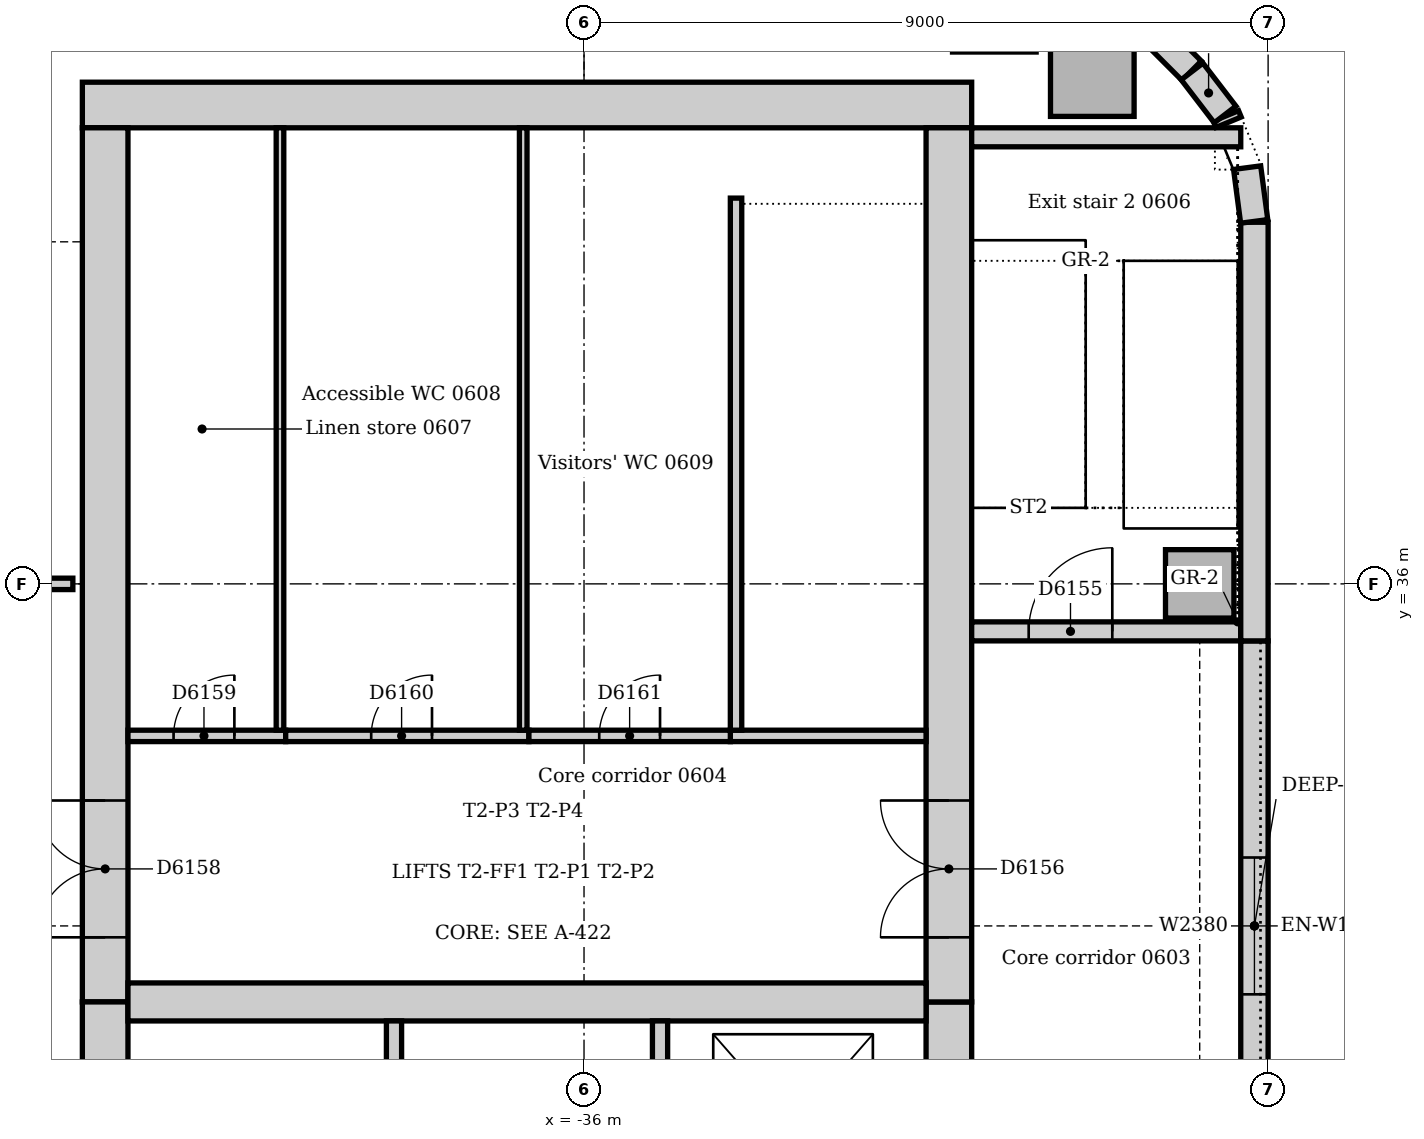
"""IFC4 building model, lengths in metres.
Left out: names, types, materials, properties, quantities, classifications, styles, units other than length and angle.
Written with IfcOpenShell. Run it as: python <this file> out.ifc"""

import sys

from ifc_helpers import new_model, si_unit, direction, frame, frame_2d, origin, origin_2d, place, context, subcontext, project, spatial, rectangle, extrude, element, fill, save


model = new_model("IFC4")
c1 = context("Model", 3, precision=1e-05, world=origin(), true_north=direction((0.0, 1.0)))
c2 = subcontext(c1, "Body", "Model", "MODEL_VIEW")
j1 = project(units=[si_unit("LENGTHUNIT", "METRE"), si_unit("PLANEANGLEUNIT", "RADIAN")], contexts=[c1])
p1 = place(None, origin())
s1 = spatial("IfcSite", under=j1, at=p1, CompositionType="ELEMENT")
p2 = place(p1, origin())
s2 = spatial("IfcBuilding", under=s1, at=p2, CompositionType="ELEMENT")
p3 = place(p2, frame((0.0, 0.0, 30.0)))
s3 = spatial("IfcBuildingStorey", under=s2, at=p3, CompositionType="ELEMENT", Elevation=30.0)
p4 = place(p3, frame((-30.9, 42.3, 0.0), z_axis=(0.0, 0.0, 1.0), x_axis=(-1.0, 0.0, 0.0)))
e1 = element("IfcWall", 1, at=p4, inside=s3, PredefinedType="SOLIDWALL", context=c2, shape_type="SweptSolid", body=[
    extrude(rectangle(XDim=11.7, YDim=0.6, at=frame_2d((5.85, 0.0))), origin(), (0.0, 0.0, 1.0), 4.0),
])
p5 = place(p3, frame((-31.2, 21.0, 0.0), z_axis=(0.0, 0.0, 1.0), x_axis=(0.0, 1.0, 0.0)))
e2 = element("IfcWall", 2, at=p5, inside=s3, PredefinedType="SOLIDWALL", context=c2, shape_type="SweptSolid", body=[
    extrude(rectangle(XDim=9.5, YDim=0.6, at=frame_2d((4.75, 0.0))), origin(), (0.0, 0.0, 1.0), 4.0),
])
p6 = place(p5, frame((5.25, 0.0, 0.0)))
e3 = element("IfcOpeningElement", 3, at=p6, cuts=e2, PredefinedType="OPENING", context=c2, shape_type="SweptSolid", body=[
    extrude(rectangle(XDim=1.0, YDim=2.1, at=frame_2d((0.5, 1.05))), frame((0.0, 0.31, 0.0), z_axis=(0.0, -1.0, 0.0), x_axis=(1.0, 0.0, 0.0)), (0.0, 0.0, 1.0), 0.62),
])
p7 = place(p3, frame((-31.2, 30.5, 0.0), z_axis=(0.0, 0.0, 1.0), x_axis=(0.0, 1.0, 0.0)))
e4 = element("IfcWall", 4, at=p7, inside=s3, PredefinedType="SOLIDWALL", context=c2, shape_type="SweptSolid", body=[
    extrude(rectangle(XDim=11.5, YDim=0.6, at=frame_2d((5.75, 0.0))), origin(), (0.0, 0.0, 1.0), 4.0),
])
p8 = place(p7, frame((0.85, 0.0, 0.0)))
e5 = element("IfcOpeningElement", 5, at=p8, cuts=e4, PredefinedType="OPENING", context=c2, shape_type="SweptSolid", body=[
    extrude(rectangle(XDim=1.8, YDim=2.1, at=frame_2d((0.9, 1.05))), frame((0.0, 0.31, 0.0), z_axis=(0.0, -1.0, 0.0), x_axis=(1.0, 0.0, 0.0)), (0.0, 0.0, 1.0), 0.62),
])
p9 = place(p3, frame((-42.3, 42.0, 0.0), z_axis=(0.0, 0.0, 1.0), x_axis=(0.0, -1.0, 0.0)))
e6 = element("IfcWall", 6, at=p9, inside=s3, PredefinedType="SOLIDWALL", context=c2, shape_type="SweptSolid", body=[
    extrude(rectangle(XDim=11.5, YDim=0.6, at=frame_2d((5.75, 0.0))), origin(), (0.0, 0.0, 1.0), 4.0),
])
p10 = place(p9, frame((8.85, 0.0, 0.0)))
e7 = element("IfcOpeningElement", 7, at=p10, cuts=e6, PredefinedType="OPENING", context=c2, shape_type="SweptSolid", body=[
    extrude(rectangle(XDim=1.8, YDim=2.1, at=frame_2d((0.9, 1.05))), frame((0.0, 0.31, 0.0), z_axis=(0.0, -1.0, 0.0), x_axis=(1.0, 0.0, 0.0)), (0.0, 0.0, 1.0), 0.62),
])
p11 = place(p3, frame((-42.3, 30.5, 0.0), z_axis=(0.0, 0.0, 1.0), x_axis=(0.0, -1.0, 0.0)))
e8 = element("IfcWall", 8, at=p11, inside=s3, PredefinedType="SOLIDWALL", context=c2, shape_type="SweptSolid", body=[
    extrude(rectangle(XDim=9.5, YDim=0.6, at=frame_2d((4.75, 0.0))), origin(), (0.0, 0.0, 1.0), 4.0),
])
p12 = place(p11, frame((3.85, 0.0, 0.0)))
e9 = element("IfcOpeningElement", 9, at=p12, cuts=e8, PredefinedType="OPENING", context=c2, shape_type="SweptSolid", body=[
    extrude(rectangle(XDim=1.8, YDim=2.1, at=frame_2d((0.9, 1.05))), frame((0.0, 0.31, 0.0), z_axis=(0.0, -1.0, 0.0), x_axis=(1.0, 0.0, 0.0)), (0.0, 0.0, 1.0), 0.62),
])
p13 = place(p3, frame((-42.0, 30.5, 0.0), z_axis=(0.0, 0.0, 1.0), x_axis=(1.0, 0.0, 0.0)))
e10 = element("IfcWall", 10, at=p13, inside=s3, PredefinedType="SOLIDWALL", context=c2, shape_type="SweptSolid", body=[
    extrude(rectangle(XDim=10.5, YDim=0.5, at=frame_2d((5.25, 0.0))), origin(), (0.0, 0.0, 1.0), 4.0),
])
p14 = place(p3, frame((-30.9, 35.375, 0.0), z_axis=(0.0, 0.0, 1.0), x_axis=(1.0, 0.0, 0.0)))
e11 = element("IfcWall", 11, at=p14, inside=s3, PredefinedType="SOLIDWALL", context=c2, shape_type="SweptSolid", body=[
    extrude(rectangle(XDim=3.54, YDim=0.25, at=frame_2d((1.77, 0.0))), origin(), (0.0, 0.0, 1.0), 4.0),
])
p15 = place(p14, frame((0.75, 0.0, 0.0)))
e12 = element("IfcOpeningElement", 12, at=p15, cuts=e11, PredefinedType="OPENING", context=c2, shape_type="SweptSolid", body=[
    extrude(rectangle(XDim=1.1, YDim=2.1, at=frame_2d((0.55, 1.05))), frame((0.0, 0.135, 0.0), z_axis=(0.0, -1.0, 0.0), x_axis=(1.0, 0.0, 0.0)), (0.0, 0.0, 1.0), 0.27),
])
p16 = place(p3, frame((-27.36, 41.875, 0.0), z_axis=(0.0, 0.0, 1.0), x_axis=(-1.0, 0.0, 0.0)))
e13 = element("IfcWall", 13, at=p16, inside=s3, PredefinedType="SOLIDWALL", context=c2, shape_type="SweptSolid", body=[
    extrude(rectangle(XDim=3.54, YDim=0.25, at=frame_2d((1.77, 0.0))), origin(), (0.0, 0.0, 1.0), 4.0),
])
for number, where, z_axis, x_axis in (
    (14, (-29.313, 42.7, 0.0), (0.0, 0.0, 1.0), (1.0, 0.0, 0.0)),
    (15, (-30.602, 43.547, 0.0), (0.0, 0.0, 1.0), (1.0, 0.0, 0.0)),
):
    element("IfcColumn", number, at=place(p3, frame(where, z_axis=z_axis, x_axis=x_axis)), inside=s3, PredefinedType="COLUMN", context=c2, shape_type="SweptSolid", body=[
        extrude(rectangle(XDim=1.1, YDim=1.1, at=origin_2d()), origin(), (0.0, 0.0, 1.0), 3.85),
    ])
p17 = place(p3, frame((-27.9, 36.0, 0.0), z_axis=(0.0, 0.0, 1.0), x_axis=(1.0, 0.0, 0.0)))
e16 = element("IfcColumn", 16, at=p17, inside=s3, PredefinedType="COLUMN", context=c2, shape_type="SweptSolid", body=[
    extrude(rectangle(XDim=0.9, YDim=0.9, at=origin_2d()), origin(), (0.0, 0.0, 1.0), 4.0),
])
p18 = place(p3, frame((-27.18, 27.75, 0.0), z_axis=(0.0, 0.0, 1.0), x_axis=(0.0, 1.0, 0.0)))
e17 = element("IfcWall", 17, at=p18, inside=s3, PredefinedType="STANDARD", context=c2, shape_type="SweptSolid", body=[
    extrude(rectangle(XDim=7.5, YDim=0.36, at=frame_2d((3.75, 0.0))), origin(), (0.0, 0.0, 1.0), 3.85),
])
p19 = place(p18, frame((2.85, 0.0, 1.2)))
e18 = element("IfcOpeningElement", 18, at=p19, cuts=e17, PredefinedType="OPENING", context=c2, shape_type="SweptSolid", body=[
    extrude(rectangle(XDim=1.8, YDim=1.2, at=frame_2d((0.9, 0.6))), frame((0.0, 0.19, 0.0), z_axis=(0.0, -1.0, 0.0), x_axis=(1.0, 0.0, 0.0)), (0.0, 0.0, 1.0), 0.38),
])
p20 = place(p3, frame((-27.18, 35.25, 0.0), z_axis=(0.0, 0.0, 1.0), x_axis=(0.0, 1.0, 0.0)))
e19 = element("IfcWall", 19, at=p20, inside=s3, PredefinedType="STANDARD", context=c2, shape_type="SweptSolid", body=[
    extrude(rectangle(XDim=5.507, YDim=0.36, at=frame_2d((2.754, 0.0))), origin(), (0.0, 0.0, 1.0), 3.85),
])
p21 = place(p3, frame((-28.006, 42.751, 0.0), z_axis=(0.0, 0.0, 1.0), x_axis=(-0.707106781187, 0.707106781187, 0.0)))
e20 = element("IfcWall", 20, at=p21, inside=s3, PredefinedType="STANDARD", context=c2, shape_type="SweptSolid", body=[
    extrude(rectangle(XDim=1.757, YDim=0.36, at=frame_2d((0.879, 0.0))), origin(), (0.0, 0.0, 1.0), 3.85),
])
p22 = place(p3, frame((-27.183, 40.769, 0.0), z_axis=(0.0, 0.0, 1.0), x_axis=(-0.13055608231, 0.99144092581, 0.0)))
e21 = element("IfcWall", 21, at=p22, inside=s3, PredefinedType="STANDARD", context=c2, shape_type="SweptSolid", body=[
    extrude(rectangle(XDim=0.713, YDim=0.36, at=frame_2d((0.356, 0.0))), origin(), (0.0, 0.0, 1.0), 3.85),
])
p23 = place(p3, frame((-27.521, 42.074, 0.0), z_axis=(0.0, 0.0, 1.0), x_axis=(-0.382549378284, 0.923935048136, 0.0)))
e22 = element("IfcWall", 22, at=p23, inside=s3, PredefinedType="STANDARD", context=c2, shape_type="SweptSolid", body=[
    extrude(rectangle(XDim=0.089, YDim=0.36, at=frame_2d((0.045, 0.0))), origin(), (0.0, 0.0, 1.0), 3.85),
])
p24 = place(p3, frame((-27.566, 42.175, 0.0), z_axis=(0.0, 0.0, 1.0), x_axis=(-0.608802368033, 0.793321924995, 0.0)))
e23 = element("IfcWall", 23, at=p24, inside=s3, PredefinedType="STANDARD", context=c2, shape_type="SweptSolid", body=[
    extrude(rectangle(XDim=0.713, YDim=0.36, at=frame_2d((0.357, 0.0))), origin(), (0.0, 0.0, 1.0), 3.85),
])
for number, where, z_axis, x_axis in (
    (24, (-38.5, 27.4, 0.0), (0.0, 0.0, 1.0), (0.0, 1.0, 0.0)),
    (25, (-35.0, 27.4, 0.0), (0.0, 0.0, 1.0), (0.0, 1.0, 0.0)),
):
    element("IfcWall", number, at=place(p3, frame(where, z_axis=z_axis, x_axis=x_axis)), inside=s3, PredefinedType="SOLIDWALL", context=c2, shape_type="SweptSolid", body=[
        extrude(rectangle(XDim=2.85, YDim=0.2, at=frame_2d((1.425, 0.0))), origin(), (0.0, 0.0, 1.0), 4.0),
    ])
p25 = place(p3, frame((-34.075, 34.0, 0.0), z_axis=(0.0, 0.0, 1.0), x_axis=(1.0, 0.0, 0.0)))
e26 = element("IfcWall", 26, at=p25, inside=s3, PredefinedType="SOLIDWALL", context=c2, shape_type="SweptSolid", body=[
    extrude(rectangle(XDim=2.575, YDim=0.15, at=frame_2d((1.288, 0.0))), origin(), (0.0, 0.0, 1.0), 4.0),
])
p26 = place(p3, frame((-34.0, 41.075, 0.0), z_axis=(0.0, 0.0, 1.0), x_axis=(0.0, -1.0, 0.0)))
e27 = element("IfcWall", 27, at=p26, inside=s3, PredefinedType="SOLIDWALL", context=c2, shape_type="SweptSolid", body=[
    extrude(rectangle(XDim=7.0, YDim=0.15, at=frame_2d((3.5, 0.0))), origin(), (0.0, 0.0, 1.0), 4.0),
])
p27 = place(p3, frame((-39.925, 34.0, 0.0), z_axis=(0.0, 0.0, 1.0), x_axis=(-1.0, 0.0, 0.0)))
e28 = element("IfcWall", 28, at=p27, inside=s3, PredefinedType="PARTITIONING", context=c2, shape_type="SweptSolid", body=[
    extrude(rectangle(XDim=2.075, YDim=0.15, at=frame_2d((1.038, 0.0))), origin(), (0.0, 0.0, 1.0), 3.85),
])
p28 = place(p27, frame((0.675, 0.0, 0.0)))
e29 = element("IfcOpeningElement", 29, at=p28, cuts=e28, PredefinedType="OPENING", context=c2, shape_type="SweptSolid", body=[
    extrude(rectangle(XDim=0.8, YDim=2.1, at=frame_2d((0.4, 1.05))), frame((0.0, 0.085, 0.0), z_axis=(0.0, -1.0, 0.0), x_axis=(1.0, 0.0, 0.0)), (0.0, 0.0, 1.0), 0.17),
])
p29 = place(p3, frame((-36.725, 34.0, 0.0), z_axis=(0.0, 0.0, 1.0), x_axis=(-1.0, 0.0, 0.0)))
e30 = element("IfcWall", 30, at=p29, inside=s3, PredefinedType="PARTITIONING", context=c2, shape_type="SweptSolid", body=[
    extrude(rectangle(XDim=3.2, YDim=0.15, at=frame_2d((1.6, 0.0))), origin(), (0.0, 0.0, 1.0), 3.85),
])
p30 = place(p29, frame((1.275, 0.0, 0.0)))
e31 = element("IfcOpeningElement", 31, at=p30, cuts=e30, PredefinedType="OPENING", context=c2, shape_type="SweptSolid", body=[
    extrude(rectangle(XDim=0.8, YDim=2.1, at=frame_2d((0.4, 1.05))), frame((0.0, 0.085, 0.0), z_axis=(0.0, -1.0, 0.0), x_axis=(1.0, 0.0, 0.0)), (0.0, 0.0, 1.0), 0.17),
])
p31 = place(p3, frame((-34.075, 34.0, 0.0), z_axis=(0.0, 0.0, 1.0), x_axis=(-1.0, 0.0, 0.0)))
e32 = element("IfcWall", 32, at=p31, inside=s3, PredefinedType="PARTITIONING", context=c2, shape_type="SweptSolid", body=[
    extrude(rectangle(XDim=2.65, YDim=0.15, at=frame_2d((1.325, 0.0))), origin(), (0.0, 0.0, 1.0), 3.85),
])
p32 = place(p31, frame((0.925, 0.0, 0.0)))
e33 = element("IfcOpeningElement", 33, at=p32, cuts=e32, PredefinedType="OPENING", context=c2, shape_type="SweptSolid", body=[
    extrude(rectangle(XDim=0.8, YDim=2.1, at=frame_2d((0.4, 1.05))), frame((0.0, 0.085, 0.0), z_axis=(0.0, -1.0, 0.0), x_axis=(1.0, 0.0, 0.0)), (0.0, 0.0, 1.0), 0.17),
])
for number, where, z_axis, x_axis in (
    (34, (-40.0, 34.075, 0.0), (0.0, 0.0, 1.0), (0.0, 1.0, 0.0)),
    (35, (-36.8, 34.075, 0.0), (0.0, 0.0, 1.0), (0.0, 1.0, 0.0)),
):
    element("IfcWall", number, at=place(p3, frame(where, z_axis=z_axis, x_axis=x_axis)), inside=s3, PredefinedType="PARTITIONING", context=c2, shape_type="SweptSolid", body=[
        extrude(rectangle(XDim=7.925, YDim=0.1, at=frame_2d((3.962, 0.0))), origin(), (0.0, 0.0, 1.0), 3.85),
    ])
p33 = place(p3, frame((-44.6, 36.0, 0.0), z_axis=(0.0, 0.0, 1.0), x_axis=(1.0, 0.0, 0.0)))
e36 = element("IfcWall", 36, at=p33, inside=s3, PredefinedType="PARTITIONING", context=c2, shape_type="SweptSolid", body=[
    extrude(rectangle(XDim=1.875, YDim=0.15, at=frame_2d((0.938, 0.0))), origin(), (0.0, 0.0, 1.0), 3.602),
])
p34 = place(p33, frame((0.5, 0.0, 0.0)))
e37 = element("IfcOpeningElement", 37, at=p34, cuts=e36, PredefinedType="OPENING", context=c2, shape_type="SweptSolid", body=[
    extrude(rectangle(XDim=0.9, YDim=2.1, at=frame_2d((0.45, 1.05))), frame((0.0, 0.085, 0.0), z_axis=(0.0, -1.0, 0.0), x_axis=(1.0, 0.0, 0.0)), (0.0, 0.0, 1.0), 0.17),
])
p35 = place(p19, origin())
e38 = element("IfcWindow", 38, at=p35, inside=s3, PartitioningType="SINGLE_PANEL", PredefinedType="WINDOW", context=c2, shape_type="SweptSolid", body=[
    extrude(rectangle(XDim=1.8, YDim=1.2, at=frame_2d((0.9, 0.6))), frame((0.0, 0.13, 0.0), z_axis=(0.0, -1.0, 0.0), x_axis=(1.0, 0.0, 0.0)), (0.0, 0.0, 1.0), 0.06),
])
fill(e18, e38)
p36 = place(p15, origin())
e39 = element("IfcDoor", 39, at=p36, inside=s3, OperationType="SINGLE_SWING_RIGHT", PredefinedType="DOOR", context=c2, shape_type="SweptSolid", body=[
    extrude(rectangle(XDim=1.1, YDim=2.1, at=frame_2d((0.55, 1.05))), frame((0.0, 0.025, 0.0), z_axis=(0.0, -1.0, 0.0), x_axis=(1.0, 0.0, 0.0)), (0.0, 0.0, 1.0), 0.05),
])
fill(e12, e39)
p37 = place(p8, origin())
e40 = element("IfcDoor", 40, at=p37, inside=s3, OperationType="DOUBLE_DOOR_SINGLE_SWING", PredefinedType="DOOR", context=c2, shape_type="SweptSolid", body=[
    extrude(rectangle(XDim=1.8, YDim=2.1, at=frame_2d((0.9, 1.05))), frame((0.0, 0.025, 0.0), z_axis=(0.0, -1.0, 0.0), x_axis=(1.0, 0.0, 0.0)), (0.0, 0.0, 1.0), 0.05),
])
fill(e5, e40)
p38 = place(p10, frame((1.8, 0.0, 0.0), z_axis=(0.0, 0.0, 1.0), x_axis=(-1.0, 0.0, 0.0)))
e41 = element("IfcDoor", 41, at=p38, inside=s3, OperationType="DOUBLE_DOOR_SINGLE_SWING", PredefinedType="DOOR", context=c2, shape_type="SweptSolid", body=[
    extrude(rectangle(XDim=1.8, YDim=2.1, at=frame_2d((0.9, 1.05))), frame((0.0, 0.025, 0.0), z_axis=(0.0, -1.0, 0.0), x_axis=(1.0, 0.0, 0.0)), (0.0, 0.0, 1.0), 0.05),
])
fill(e7, e41)
p39 = place(p28, frame((0.8, 0.0, 0.0), z_axis=(0.0, 0.0, 1.0), x_axis=(-1.0, 0.0, 0.0)))
e42 = element("IfcDoor", 42, at=p39, inside=s3, OperationType="SINGLE_SWING_RIGHT", PredefinedType="DOOR", context=c2, shape_type="SweptSolid", body=[
    extrude(rectangle(XDim=0.8, YDim=2.1, at=frame_2d((0.4, 1.05))), frame((0.0, 0.025, 0.0), z_axis=(0.0, -1.0, 0.0), x_axis=(1.0, 0.0, 0.0)), (0.0, 0.0, 1.0), 0.05),
])
fill(e29, e42)
p40 = place(p30, frame((0.8, 0.0, 0.0), z_axis=(0.0, 0.0, 1.0), x_axis=(-1.0, 0.0, 0.0)))
e43 = element("IfcDoor", 43, at=p40, inside=s3, OperationType="SINGLE_SWING_RIGHT", PredefinedType="DOOR", context=c2, shape_type="SweptSolid", body=[
    extrude(rectangle(XDim=0.8, YDim=2.1, at=frame_2d((0.4, 1.05))), frame((0.0, 0.025, 0.0), z_axis=(0.0, -1.0, 0.0), x_axis=(1.0, 0.0, 0.0)), (0.0, 0.0, 1.0), 0.05),
])
fill(e31, e43)
p41 = place(p32, frame((0.8, 0.0, 0.0), z_axis=(0.0, 0.0, 1.0), x_axis=(-1.0, 0.0, 0.0)))
e44 = element("IfcDoor", 44, at=p41, inside=s3, OperationType="SINGLE_SWING_RIGHT", PredefinedType="DOOR", context=c2, shape_type="SweptSolid", body=[
    extrude(rectangle(XDim=0.8, YDim=2.1, at=frame_2d((0.4, 1.05))), frame((0.0, 0.025, 0.0), z_axis=(0.0, -1.0, 0.0), x_axis=(1.0, 0.0, 0.0)), (0.0, 0.0, 1.0), 0.05),
])
fill(e33, e44)
save(model, sys.argv[1])
